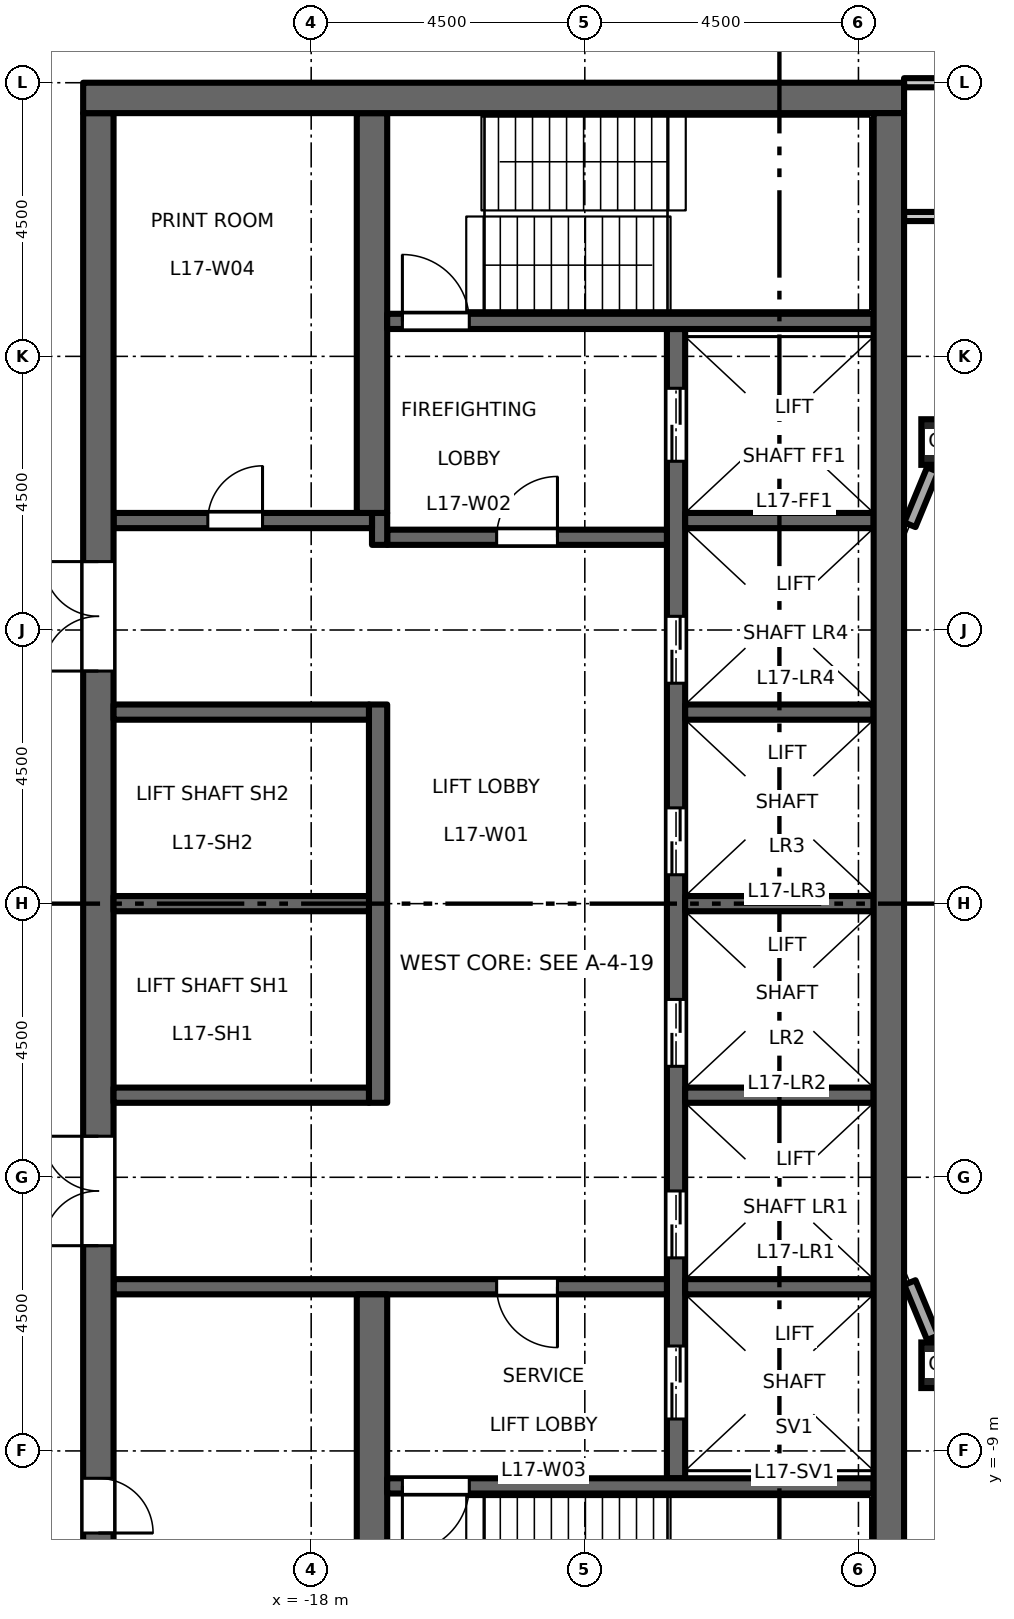
"""IFC4 building model, lengths in metres.
Left out: names, types, materials, properties, quantities, classifications, styles, units other than length and angle.
Written with IfcOpenShell. Run it as: python <this file> out.ifc"""

import sys

from ifc_helpers import new_model, si_unit, direction, frame, frame_2d, origin, origin_2d, place, context, subcontext, project, spatial, rectangle, hollow_rectangle, extrude, element, fill, save


model = new_model("IFC4")
c1 = context("Model", 3, precision=1e-05, world=origin(), true_north=direction((0.0, 1.0)))
c2 = subcontext(c1, "Body", "Model", "MODEL_VIEW")
j1 = project(units=[si_unit("LENGTHUNIT", "METRE"), si_unit("PLANEANGLEUNIT", "RADIAN")], contexts=[c1])
p1 = place(None, origin())
s1 = spatial("IfcSite", under=j1, at=p1, CompositionType="ELEMENT")
p2 = place(p1, origin())
s2 = spatial("IfcBuilding", under=s1, at=p2, CompositionType="ELEMENT")
p3 = place(p2, frame((0.0, 0.0, 80.7)))
s3 = spatial("IfcBuildingStorey", under=s2, at=p3, CompositionType="ELEMENT", Elevation=80.7)
for number, where, z_axis, x_axis in (
    (1, (-7.591, -7.591, 0.0), (0.0, 0.0, 1.0), (1.0, 0.0, 0.0)),
    (2, (-7.591, 7.591, 0.0), (0.0, 0.0, 1.0), (1.0, 0.0, 0.0)),
):
    element("IfcColumn", number, at=place(p3, frame(where, z_axis=z_axis, x_axis=x_axis)), inside=s3, PredefinedType="COLUMN", context=c2, shape_type="SweptSolid", body=[
        extrude(hollow_rectangle(XDim=0.75, YDim=0.75, WallThickness=0.045, at=origin_2d()), origin(), (0.0, 0.0, 1.0), 4.5),
    ])
p4 = place(p3, frame((-12.0, -9.45, 0.0), z_axis=(0.0, 0.0, 1.0), x_axis=(0.0, 1.0, 0.0)))
e3 = element("IfcWall", 3, at=p4, inside=s3, PredefinedType="SHEAR", context=c2, shape_type="SweptSolid", body=[
    extrude(rectangle(XDim=18.9, YDim=0.3, at=frame_2d((9.45, 0.0))), origin(), (0.0, 0.0, 1.0), 4.35),
])
p5 = place(p4, frame((3.625, 0.0, 0.0)))
e4 = element("IfcOpeningElement", 4, at=p5, cuts=e3, PredefinedType="OPENING", context=c2, shape_type="SweptSolid", body=[
    extrude(rectangle(XDim=1.1, YDim=2.1, at=frame_2d((0.55, 1.05))), frame((0.0, 0.16, 0.0), z_axis=(0.0, -1.0, 0.0), x_axis=(1.0, 0.0, 0.0)), (0.0, 0.0, 1.0), 0.32),
])
p6 = place(p4, frame((6.775, 0.0, 0.0)))
e5 = element("IfcOpeningElement", 5, at=p6, cuts=e3, PredefinedType="OPENING", context=c2, shape_type="SweptSolid", body=[
    extrude(rectangle(XDim=1.1, YDim=2.1, at=frame_2d((0.55, 1.05))), frame((0.0, 0.16, 0.0), z_axis=(0.0, -1.0, 0.0), x_axis=(1.0, 0.0, 0.0)), (0.0, 0.0, 1.0), 0.32),
])
p7 = place(p4, frame((9.925, 0.0, 0.0)))
e6 = element("IfcOpeningElement", 6, at=p7, cuts=e3, PredefinedType="OPENING", context=c2, shape_type="SweptSolid", body=[
    extrude(rectangle(XDim=1.1, YDim=2.1, at=frame_2d((0.55, 1.05))), frame((0.0, 0.16, 0.0), z_axis=(0.0, -1.0, 0.0), x_axis=(1.0, 0.0, 0.0)), (0.0, 0.0, 1.0), 0.32),
])
p8 = place(p4, frame((13.075, 0.0, 0.0)))
e7 = element("IfcOpeningElement", 7, at=p8, cuts=e3, PredefinedType="OPENING", context=c2, shape_type="SweptSolid", body=[
    extrude(rectangle(XDim=1.1, YDim=2.1, at=frame_2d((0.55, 1.05))), frame((0.0, 0.16, 0.0), z_axis=(0.0, -1.0, 0.0), x_axis=(1.0, 0.0, 0.0)), (0.0, 0.0, 1.0), 0.32),
])
p9 = place(p4, frame((16.725, 0.0, 0.0)))
e8 = element("IfcOpeningElement", 8, at=p9, cuts=e3, PredefinedType="OPENING", context=c2, shape_type="SweptSolid", body=[
    extrude(rectangle(XDim=1.2, YDim=2.1, at=frame_2d((0.6, 1.05))), frame((0.0, 0.16, 0.0), z_axis=(0.0, -1.0, 0.0), x_axis=(1.0, 0.0, 0.0)), (0.0, 0.0, 1.0), 0.32),
])
p10 = place(p4, frame((0.975, 0.0, 0.0)))
e9 = element("IfcOpeningElement", 9, at=p10, cuts=e3, PredefinedType="OPENING", context=c2, shape_type="SweptSolid", body=[
    extrude(rectangle(XDim=1.2, YDim=2.1, at=frame_2d((0.6, 1.05))), frame((0.0, 0.16, 0.0), z_axis=(0.0, -1.0, 0.0), x_axis=(1.0, 0.0, 0.0)), (0.0, 0.0, 1.0), 0.32),
])
p11 = place(p3, frame((-12.15, 6.025, 0.0), z_axis=(0.0, 0.0, 1.0), x_axis=(-1.0, 0.0, 0.0)))
e10 = element("IfcWall", 10, at=p11, inside=s3, PredefinedType="SHEAR", context=c2, shape_type="SweptSolid", body=[
    extrude(rectangle(XDim=4.6, YDim=0.25, at=frame_2d((2.3, 0.0))), origin(), (0.0, 0.0, 1.0), 4.35),
])
p12 = place(p11, frame((1.8, 0.0, 0.0)))
e11 = element("IfcOpeningElement", 11, at=p12, cuts=e10, PredefinedType="OPENING", context=c2, shape_type="SweptSolid", body=[
    extrude(rectangle(XDim=1.0, YDim=2.1, at=frame_2d((0.5, 1.05))), frame((0.0, 0.135, 0.0), z_axis=(0.0, -1.0, 0.0), x_axis=(1.0, 0.0, 0.0)), (0.0, 0.0, 1.0), 0.27),
])
p13 = place(p3, frame((-16.875, 5.9, 0.0), z_axis=(0.0, 0.0, 1.0), x_axis=(0.0, 1.0, 0.0)))
e12 = element("IfcWall", 12, at=p13, inside=s3, PredefinedType="SHEAR", context=c2, shape_type="SweptSolid", body=[
    extrude(rectangle(XDim=0.525, YDim=0.25, at=frame_2d((0.263, 0.0))), origin(), (0.0, 0.0, 1.0), 4.35),
])
p14 = place(p3, frame((-17.0, 6.3, 0.0), z_axis=(0.0, 0.0, 1.0), x_axis=(-1.0, 0.0, 0.0)))
e13 = element("IfcWall", 13, at=p14, inside=s3, PredefinedType="SHEAR", context=c2, shape_type="SweptSolid", body=[
    extrude(rectangle(XDim=4.25, YDim=0.25, at=frame_2d((2.125, 0.0))), origin(), (0.0, 0.0, 1.0), 4.35),
])
p15 = place(p14, frame((1.8, 0.0, 0.0)))
e14 = element("IfcOpeningElement", 14, at=p15, cuts=e13, PredefinedType="OPENING", context=c2, shape_type="SweptSolid", body=[
    extrude(rectangle(XDim=0.9, YDim=2.1, at=frame_2d((0.45, 1.05))), frame((0.0, 0.135, 0.0), z_axis=(0.0, -1.0, 0.0), x_axis=(1.0, 0.0, 0.0)), (0.0, 0.0, 1.0), 0.27),
])
p16 = place(p3, frame((-12.15, -6.3, 0.0), z_axis=(0.0, 0.0, 1.0), x_axis=(-1.0, 0.0, 0.0)))
e15 = element("IfcWall", 15, at=p16, inside=s3, PredefinedType="SHEAR", context=c2, shape_type="SweptSolid", body=[
    extrude(rectangle(XDim=9.1, YDim=0.25, at=frame_2d((4.55, 0.0))), origin(), (0.0, 0.0, 1.0), 4.35),
])
p17 = place(p16, frame((1.8, 0.0, 0.0)))
e16 = element("IfcOpeningElement", 16, at=p17, cuts=e15, PredefinedType="OPENING", context=c2, shape_type="SweptSolid", body=[
    extrude(rectangle(XDim=1.0, YDim=2.1, at=frame_2d((0.5, 1.05))), frame((0.0, 0.135, 0.0), z_axis=(0.0, -1.0, 0.0), x_axis=(1.0, 0.0, 0.0)), (0.0, 0.0, 1.0), 0.27),
])
p18 = place(p3, frame((-21.5, -13.0, 0.0), z_axis=(0.0, 0.0, 1.0), x_axis=(0.0, 1.0, 0.0)))
e17 = element("IfcWall", 17, at=p18, inside=s3, PredefinedType="SHEAR", context=c2, shape_type="SweptSolid", body=[
    extrude(rectangle(XDim=26.0, YDim=0.5, at=frame_2d((13.0, 0.0))), origin(), (0.0, 0.0, 1.0), 4.35),
])
p19 = place(p18, frame((16.825, 0.0, 0.0)))
e18 = element("IfcOpeningElement", 18, at=p19, cuts=e17, PredefinedType="OPENING", context=c2, shape_type="SweptSolid", body=[
    extrude(rectangle(XDim=1.8, YDim=2.1, at=frame_2d((0.9, 1.05))), frame((0.0, 0.26, 0.0), z_axis=(0.0, -1.0, 0.0), x_axis=(1.0, 0.0, 0.0)), (0.0, 0.0, 1.0), 0.52),
])
p20 = place(p18, frame((7.375, 0.0, 0.0)))
e19 = element("IfcOpeningElement", 19, at=p20, cuts=e17, PredefinedType="OPENING", context=c2, shape_type="SweptSolid", body=[
    extrude(rectangle(XDim=1.8, YDim=2.1, at=frame_2d((0.9, 1.05))), frame((0.0, 0.26, 0.0), z_axis=(0.0, -1.0, 0.0), x_axis=(1.0, 0.0, 0.0)), (0.0, 0.0, 1.0), 0.52),
])
p21 = place(p18, frame((2.65, 0.0, 0.0)))
e20 = element("IfcOpeningElement", 20, at=p21, cuts=e17, PredefinedType="OPENING", context=c2, shape_type="SweptSolid", body=[
    extrude(rectangle(XDim=0.9, YDim=2.1, at=frame_2d((0.45, 1.05))), frame((0.0, 0.26, 0.0), z_axis=(0.0, -1.0, 0.0), x_axis=(1.0, 0.0, 0.0)), (0.0, 0.0, 1.0), 0.52),
])
p22 = place(p3, frame((-16.9, -3.275, 0.0), z_axis=(0.0, 0.0, 1.0), x_axis=(0.0, 1.0, 0.0)))
e21 = element("IfcWall", 21, at=p22, inside=s3, PredefinedType="SHEAR", context=c2, shape_type="SweptSolid", body=[
    extrude(rectangle(XDim=6.55, YDim=0.3, at=frame_2d((3.275, 0.0))), origin(), (0.0, 0.0, 1.0), 4.35),
])
for number, where, z_axis, x_axis in (
    (22, (-17.05, 0.0, 0.0), (0.0, 0.0, 1.0), (-1.0, 0.0, 0.0)),
    (23, (-17.05, 3.15, 0.0), (0.0, 0.0, 1.0), (-1.0, 0.0, 0.0)),
    (24, (-17.05, -3.15, 0.0), (0.0, 0.0, 1.0), (-1.0, 0.0, 0.0)),
):
    element("IfcWall", number, at=place(p3, frame(where, z_axis=z_axis, x_axis=x_axis)), inside=s3, PredefinedType="SHEAR", context=c2, shape_type="SweptSolid", body=[
        extrude(rectangle(XDim=4.2, YDim=0.25, at=frame_2d((2.1, 0.0))), origin(), (0.0, 0.0, 1.0), 4.35),
    ])
for number, where, z_axis, x_axis in (
    (25, (-17.0, 6.425, 0.0), (0.0, 0.0, 1.0), (0.0, 1.0, 0.0)),
    (26, (-17.0, -13.0, 0.0), (0.0, 0.0, 1.0), (0.0, 1.0, 0.0)),
):
    element("IfcWall", number, at=place(p3, frame(where, z_axis=z_axis, x_axis=x_axis)), inside=s3, PredefinedType="SHEAR", context=c2, shape_type="SweptSolid", body=[
        extrude(rectangle(XDim=6.575, YDim=0.5, at=frame_2d((3.288, 0.0))), origin(), (0.0, 0.0, 1.0), 4.35),
    ])
for number, where, z_axis, x_axis in (
    (27, (-8.75, 0.0, 0.0), (0.0, 0.0, 1.0), (-1.0, 0.0, 0.0)),
    (28, (-8.75, 3.15, 0.0), (0.0, 0.0, 1.0), (-1.0, 0.0, 0.0)),
    (29, (-8.75, 6.3, 0.0), (0.0, 0.0, 1.0), (-1.0, 0.0, 0.0)),
    (30, (-8.75, -3.15, 0.0), (0.0, 0.0, 1.0), (-1.0, 0.0, 0.0)),
    (31, (-8.75, -6.3, 0.0), (0.0, 0.0, 1.0), (-1.0, 0.0, 0.0)),
):
    element("IfcWall", number, at=place(p3, frame(where, z_axis=z_axis, x_axis=x_axis)), inside=s3, PredefinedType="SHEAR", context=c2, shape_type="SweptSolid", body=[
        extrude(rectangle(XDim=3.1, YDim=0.25, at=frame_2d((1.55, 0.0))), origin(), (0.0, 0.0, 1.0), 4.35),
    ])
p23 = place(p3, frame((-8.75, 9.575, 0.0), z_axis=(0.0, 0.0, 1.0), x_axis=(-1.0, 0.0, 0.0)))
e32 = element("IfcWall", 32, at=p23, inside=s3, PredefinedType="SHEAR", context=c2, shape_type="SweptSolid", body=[
    extrude(rectangle(XDim=8.0, YDim=0.25, at=frame_2d((4.0, 0.0))), origin(), (0.0, 0.0, 1.0), 4.35),
])
p24 = place(p23, frame((6.65, 0.0, 0.0)))
e33 = element("IfcOpeningElement", 33, at=p24, cuts=e32, PredefinedType="OPENING", context=c2, shape_type="SweptSolid", body=[
    extrude(rectangle(XDim=1.1, YDim=2.1, at=frame_2d((0.55, 1.05))), frame((0.0, 0.135, 0.0), z_axis=(0.0, -1.0, 0.0), x_axis=(1.0, 0.0, 0.0)), (0.0, 0.0, 1.0), 0.27),
])
p25 = place(p3, frame((-8.75, -9.575, 0.0), z_axis=(0.0, 0.0, 1.0), x_axis=(-1.0, 0.0, 0.0)))
e34 = element("IfcWall", 34, at=p25, inside=s3, PredefinedType="SHEAR", context=c2, shape_type="SweptSolid", body=[
    extrude(rectangle(XDim=8.0, YDim=0.25, at=frame_2d((4.0, 0.0))), origin(), (0.0, 0.0, 1.0), 4.35),
])
p26 = place(p25, frame((6.65, 0.0, 0.0)))
e35 = element("IfcOpeningElement", 35, at=p26, cuts=e34, PredefinedType="OPENING", context=c2, shape_type="SweptSolid", body=[
    extrude(rectangle(XDim=1.1, YDim=2.1, at=frame_2d((0.55, 1.05))), frame((0.0, 0.135, 0.0), z_axis=(0.0, -1.0, 0.0), x_axis=(1.0, 0.0, 0.0)), (0.0, 0.0, 1.0), 0.27),
])
p27 = place(p3, frame((-8.25, 13.25, 0.0), z_axis=(0.0, 0.0, 1.0), x_axis=(-1.0, 0.0, 0.0)))
e36 = element("IfcWall", 36, at=p27, inside=s3, PredefinedType="SHEAR", context=c2, shape_type="SweptSolid", body=[
    extrude(rectangle(XDim=13.5, YDim=0.5, at=frame_2d((6.75, 0.0))), origin(), (0.0, 0.0, 1.0), 4.35),
])
p28 = place(p3, frame((-8.5, -13.0, 0.0), z_axis=(0.0, 0.0, 1.0), x_axis=(0.0, 1.0, 0.0)))
e37 = element("IfcWall", 37, at=p28, inside=s3, PredefinedType="SHEAR", context=c2, shape_type="SweptSolid", body=[
    extrude(rectangle(XDim=26.0, YDim=0.5, at=frame_2d((13.0, 0.0))), origin(), (0.0, 0.0, 1.0), 4.35),
])
for number, where, z_axis, x_axis in (
    (38, (-7.779, 7.138, 0.0), (0.0, 0.0, 1.0), (-0.383, -0.924, 0.0)),
    (39, (-8.154, -6.231, 0.0), (0.0, 0.0, 1.0), (0.383, -0.924, 0.0)),
):
    element("IfcWall", number, at=place(p3, frame(where, z_axis=z_axis, x_axis=x_axis)), inside=s3, PredefinedType="STANDARD", context=c2, shape_type="SweptSolid", body=[
        extrude(rectangle(XDim=0.982, YDim=0.2, at=frame_2d((0.491, 0.0))), origin(), (0.0, 0.0, 1.0), 3.73),
    ])
p29 = place(p3, frame((-8.25, 11.3, 0.0), z_axis=(0.0, 0.0, 1.0), x_axis=(1.0, 0.0, 0.0)))
e40 = element("IfcWall", 40, at=p29, inside=s3, PredefinedType="PARTITIONING", context=c2, shape_type="SweptSolid", body=[
    extrude(rectangle(XDim=15.17, YDim=0.15, at=frame_2d((7.585, 0.0))), origin(), (0.0, 0.0, 1.0), 4.35),
])
p30 = place(p29, frame((2.65, 0.0, 0.0)))
e41 = element("IfcOpeningElement", 41, at=p30, cuts=e40, PredefinedType="OPENING", context=c2, shape_type="SweptSolid", body=[
    extrude(rectangle(XDim=1.0, YDim=2.1, at=frame_2d((0.5, 1.05))), frame((0.0, 0.085, 0.0), z_axis=(0.0, -1.0, 0.0), x_axis=(1.0, 0.0, 0.0)), (0.0, 0.0, 1.0), 0.17),
])
p31 = place(p29, frame((8.9, 0.0, 0.0)))
e42 = element("IfcOpeningElement", 42, at=p31, cuts=e40, PredefinedType="OPENING", context=c2, shape_type="SweptSolid", body=[
    extrude(rectangle(XDim=1.0, YDim=2.1, at=frame_2d((0.5, 1.05))), frame((0.0, 0.085, 0.0), z_axis=(0.0, -1.0, 0.0), x_axis=(1.0, 0.0, 0.0)), (0.0, 0.0, 1.0), 0.17),
])
p32 = place(p29, frame((13.4, 0.0, 0.0)))
e43 = element("IfcOpeningElement", 43, at=p32, cuts=e40, PredefinedType="OPENING", context=c2, shape_type="SweptSolid", body=[
    extrude(rectangle(XDim=1.0, YDim=2.1, at=frame_2d((0.5, 1.05))), frame((0.0, 0.085, 0.0), z_axis=(0.0, -1.0, 0.0), x_axis=(1.0, 0.0, 0.0)), (0.0, 0.0, 1.0), 0.17),
])
p33 = place(p3, frame((-8.25, 13.5, 0.0), z_axis=(0.0, 0.0, 1.0), x_axis=(1.0, 0.0, 0.0)))
e44 = element("IfcWall", 44, at=p33, inside=s3, PredefinedType="PARTITIONING", context=c2, shape_type="SweptSolid", body=[
    extrude(rectangle(XDim=16.5, YDim=0.15, at=frame_2d((8.25, 0.0))), origin(), (0.0, 0.0, 1.0), 3.85),
])
p34 = place(p33, frame((7.65, 0.0, 0.0)))
e45 = element("IfcOpeningElement", 45, at=p34, cuts=e44, PredefinedType="OPENING", context=c2, shape_type="SweptSolid", body=[
    extrude(rectangle(XDim=1.0, YDim=2.1, at=frame_2d((0.5, 1.05))), frame((0.0, 0.085, 0.0), z_axis=(0.0, -1.0, 0.0), x_axis=(1.0, 0.0, 0.0)), (0.0, 0.0, 1.0), 0.17),
])
p35 = place(p12, origin())
e46 = element("IfcDoor", 46, at=p35, inside=s3, OperationType="SINGLE_SWING_LEFT", PredefinedType="DOOR", context=c2, shape_type="SweptSolid", body=[
    extrude(rectangle(XDim=1.0, YDim=2.1, at=frame_2d((0.5, 1.05))), frame((0.0, 0.025, 0.0), z_axis=(0.0, -1.0, 0.0), x_axis=(1.0, 0.0, 0.0)), (0.0, 0.0, 1.0), 0.05),
])
fill(e11, e46)
p36 = place(p17, origin())
e47 = element("IfcDoor", 47, at=p36, inside=s3, OperationType="SINGLE_SWING_RIGHT", PredefinedType="DOOR", context=c2, shape_type="SweptSolid", body=[
    extrude(rectangle(XDim=1.0, YDim=2.1, at=frame_2d((0.5, 1.05))), frame((0.0, 0.025, 0.0), z_axis=(0.0, -1.0, 0.0), x_axis=(1.0, 0.0, 0.0)), (0.0, 0.0, 1.0), 0.05),
])
fill(e16, e47)
p37 = place(p24, origin())
e48 = element("IfcDoor", 48, at=p37, inside=s3, OperationType="SINGLE_SWING_RIGHT", PredefinedType="DOOR", context=c2, shape_type="SweptSolid", body=[
    extrude(rectangle(XDim=1.1, YDim=2.1, at=frame_2d((0.55, 1.05))), frame((0.0, 0.025, 0.0), z_axis=(0.0, -1.0, 0.0), x_axis=(1.0, 0.0, 0.0)), (0.0, 0.0, 1.0), 0.05),
])
fill(e33, e48)
p38 = place(p26, origin())
e49 = element("IfcDoor", 49, at=p38, inside=s3, OperationType="SINGLE_SWING_LEFT", PredefinedType="DOOR", context=c2, shape_type="SweptSolid", body=[
    extrude(rectangle(XDim=1.1, YDim=2.1, at=frame_2d((0.55, 1.05))), frame((0.0, 0.025, 0.0), z_axis=(0.0, -1.0, 0.0), x_axis=(1.0, 0.0, 0.0)), (0.0, 0.0, 1.0), 0.05),
])
fill(e35, e49)
p39 = place(p19, origin())
e50 = element("IfcDoor", 50, at=p39, inside=s3, OperationType="DOUBLE_DOOR_DOUBLE_SWING", PredefinedType="DOOR", context=c2, shape_type="SweptSolid", body=[
    extrude(rectangle(XDim=1.8, YDim=2.1, at=frame_2d((0.9, 1.05))), frame((0.0, 0.025, 0.0), z_axis=(0.0, -1.0, 0.0), x_axis=(1.0, 0.0, 0.0)), (0.0, 0.0, 1.0), 0.05),
])
fill(e18, e50)
p40 = place(p20, origin())
e51 = element("IfcDoor", 51, at=p40, inside=s3, OperationType="DOUBLE_DOOR_DOUBLE_SWING", PredefinedType="DOOR", context=c2, shape_type="SweptSolid", body=[
    extrude(rectangle(XDim=1.8, YDim=2.1, at=frame_2d((0.9, 1.05))), frame((0.0, 0.025, 0.0), z_axis=(0.0, -1.0, 0.0), x_axis=(1.0, 0.0, 0.0)), (0.0, 0.0, 1.0), 0.05),
])
fill(e19, e51)
p41 = place(p5, origin())
e52 = element("IfcDoor", 52, at=p41, inside=s3, OperationType="DOUBLE_DOOR_SLIDING", PredefinedType="DOOR", context=c2, shape_type="SweptSolid", body=[
    extrude(rectangle(XDim=1.1, YDim=2.1, at=frame_2d((0.55, 1.05))), frame((0.0, 0.025, 0.0), z_axis=(0.0, -1.0, 0.0), x_axis=(1.0, 0.0, 0.0)), (0.0, 0.0, 1.0), 0.05),
])
fill(e4, e52)
p42 = place(p6, origin())
e53 = element("IfcDoor", 53, at=p42, inside=s3, OperationType="DOUBLE_DOOR_SLIDING", PredefinedType="DOOR", context=c2, shape_type="SweptSolid", body=[
    extrude(rectangle(XDim=1.1, YDim=2.1, at=frame_2d((0.55, 1.05))), frame((0.0, 0.025, 0.0), z_axis=(0.0, -1.0, 0.0), x_axis=(1.0, 0.0, 0.0)), (0.0, 0.0, 1.0), 0.05),
])
fill(e5, e53)
p43 = place(p7, origin())
e54 = element("IfcDoor", 54, at=p43, inside=s3, OperationType="DOUBLE_DOOR_SLIDING", PredefinedType="DOOR", context=c2, shape_type="SweptSolid", body=[
    extrude(rectangle(XDim=1.1, YDim=2.1, at=frame_2d((0.55, 1.05))), frame((0.0, 0.025, 0.0), z_axis=(0.0, -1.0, 0.0), x_axis=(1.0, 0.0, 0.0)), (0.0, 0.0, 1.0), 0.05),
])
fill(e6, e54)
p44 = place(p8, origin())
e55 = element("IfcDoor", 55, at=p44, inside=s3, OperationType="DOUBLE_DOOR_SLIDING", PredefinedType="DOOR", context=c2, shape_type="SweptSolid", body=[
    extrude(rectangle(XDim=1.1, YDim=2.1, at=frame_2d((0.55, 1.05))), frame((0.0, 0.025, 0.0), z_axis=(0.0, -1.0, 0.0), x_axis=(1.0, 0.0, 0.0)), (0.0, 0.0, 1.0), 0.05),
])
fill(e7, e55)
p45 = place(p9, origin())
e56 = element("IfcDoor", 56, at=p45, inside=s3, OperationType="DOUBLE_DOOR_SLIDING", PredefinedType="DOOR", context=c2, shape_type="SweptSolid", body=[
    extrude(rectangle(XDim=1.2, YDim=2.1, at=frame_2d((0.6, 1.05))), frame((0.0, 0.025, 0.0), z_axis=(0.0, -1.0, 0.0), x_axis=(1.0, 0.0, 0.0)), (0.0, 0.0, 1.0), 0.05),
])
fill(e8, e56)
p46 = place(p10, origin())
e57 = element("IfcDoor", 57, at=p46, inside=s3, OperationType="DOUBLE_DOOR_SLIDING", PredefinedType="DOOR", context=c2, shape_type="SweptSolid", body=[
    extrude(rectangle(XDim=1.2, YDim=2.1, at=frame_2d((0.6, 1.05))), frame((0.0, 0.025, 0.0), z_axis=(0.0, -1.0, 0.0), x_axis=(1.0, 0.0, 0.0)), (0.0, 0.0, 1.0), 0.05),
])
fill(e9, e57)
p47 = place(p15, origin())
e58 = element("IfcDoor", 58, at=p47, inside=s3, OperationType="SINGLE_SWING_LEFT", PredefinedType="DOOR", context=c2, shape_type="SweptSolid", body=[
    extrude(rectangle(XDim=0.9, YDim=2.1, at=frame_2d((0.45, 1.05))), frame((0.0, 0.025, 0.0), z_axis=(0.0, -1.0, 0.0), x_axis=(1.0, 0.0, 0.0)), (0.0, 0.0, 1.0), 0.05),
])
fill(e14, e58)
p48 = place(p21, origin())
e59 = element("IfcDoor", 59, at=p48, inside=s3, OperationType="SINGLE_SWING_LEFT", PredefinedType="DOOR", context=c2, shape_type="SweptSolid", body=[
    extrude(rectangle(XDim=0.9, YDim=2.1, at=frame_2d((0.45, 1.05))), frame((0.0, 0.025, 0.0), z_axis=(0.0, -1.0, 0.0), x_axis=(1.0, 0.0, 0.0)), (0.0, 0.0, 1.0), 0.05),
])
fill(e20, e59)
save(model, sys.argv[1])
